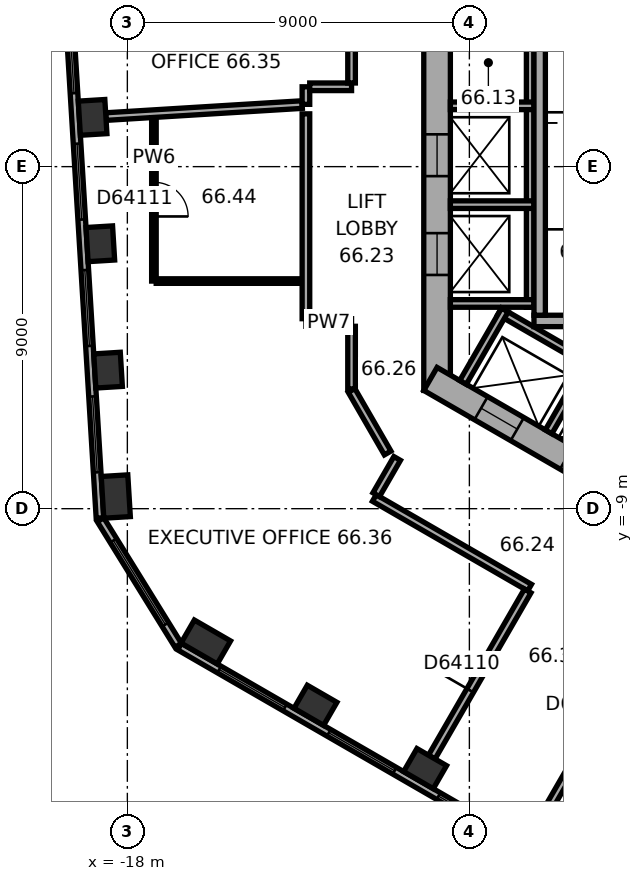
"""IFC4 building model, lengths in metres.
Left out: names, types, materials, properties, quantities, classifications, styles, units other than length and angle.
Written with IfcOpenShell. Run it as: python <this file> out.ifc"""

import sys

from ifc_helpers import new_model, si_unit, direction, frame, frame_2d, origin, origin_2d, place, context, subcontext, project, spatial, rectangle, extrude, element, fill, save


model = new_model("IFC4")
c1 = context("Model", 3, precision=1e-05, world=origin(), true_north=direction((0.0, 1.0)))
c2 = subcontext(c1, "Body", "Model", "MODEL_VIEW")
j1 = project(units=[si_unit("LENGTHUNIT", "METRE"), si_unit("PLANEANGLEUNIT", "RADIAN")], contexts=[c1])
p1 = place(None, origin())
s1 = spatial("IfcSite", under=j1, at=p1, CompositionType="ELEMENT")
p2 = place(p1, origin())
s2 = spatial("IfcBuilding", under=s1, at=p2, CompositionType="ELEMENT")
p3 = place(p2, frame((0.0, 0.0, 267.2)))
s3 = spatial("IfcBuildingStorey", under=s2, at=p3, CompositionType="ELEMENT", Elevation=267.2)
for number, where, z_axis, x_axis in (
    (1, (-18.914, 1.296, 0.0), (0.0, 0.0, 1.0), (0.061, -0.998, 0.0)),
    (2, (-18.711, -2.03, 0.0), (0.0, 0.0, 1.0), (0.061, -0.998, 0.0)),
    (3, (-18.508, -5.355, 0.0), (0.0, 0.0, 1.0), (0.061, -0.998, 0.0)),
):
    element("IfcColumn", number, at=place(p3, frame(where, z_axis=z_axis, x_axis=x_axis)), inside=s3, PredefinedType="COLUMN", context=c2, shape_type="SweptSolid", body=[
        extrude(rectangle(XDim=0.9, YDim=0.7, at=origin_2d()), origin(), (0.0, 0.0, 1.0), 3.7),
    ])
for number, where, z_axis, x_axis in (
    (4, (-18.304, -8.68, 0.0), (0.0, 0.0, 1.0), (0.061, -0.998, 0.0)),
    (5, (-15.936, -12.508, 0.0), (0.0, 0.0, 1.0), (0.866, -0.5, 0.0)),
):
    element("IfcColumn", number, at=place(p3, frame(where, z_axis=z_axis, x_axis=x_axis)), inside=s3, PredefinedType="COLUMN", context=c2, shape_type="SweptSolid", body=[
        extrude(rectangle(XDim=1.1, YDim=0.7, at=origin_2d()), origin(), (0.0, 0.0, 1.0), 3.7),
    ])
for number, where, z_axis, x_axis in (
    (6, (-13.05, -14.174, 0.0), (0.0, 0.0, 1.0), (0.866, -0.5, 0.0)),
    (7, (-10.165, -15.84, 0.0), (0.0, 0.0, 1.0), (0.866, -0.5, 0.0)),
):
    element("IfcColumn", number, at=place(p3, frame(where, z_axis=z_axis, x_axis=x_axis)), inside=s3, PredefinedType="COLUMN", context=c2, shape_type="SweptSolid", body=[
        extrude(rectangle(XDim=0.9, YDim=0.7, at=origin_2d()), origin(), (0.0, 0.0, 1.0), 3.7),
    ])
p4 = place(p3, frame((-9.85, 5.889, 0.0), z_axis=(0.0, 0.0, 1.0), x_axis=(0.0, -1.0, 0.0)))
e8 = element("IfcWall", 8, at=p4, inside=s3, PredefinedType="SHEAR", context=c2, shape_type="SweptSolid", body=[
    extrude(rectangle(XDim=11.778, YDim=0.7, at=frame_2d((5.889, 0.0))), origin(), (0.0, 0.0, 1.0), 3.7),
])
p5 = place(p4, frame((5.039, 0.0, 0.0)))
e9 = element("IfcOpeningElement", 9, at=p5, cuts=e8, PredefinedType="OPENING", context=c2, shape_type="SweptSolid", body=[
    extrude(rectangle(XDim=1.1, YDim=2.1, at=frame_2d((0.55, 1.05))), frame((0.0, 0.36, 0.0), z_axis=(0.0, -1.0, 0.0), x_axis=(1.0, 0.0, 0.0)), (0.0, 0.0, 1.0), 0.72),
])
p6 = place(p4, frame((7.639, 0.0, 0.0)))
e10 = element("IfcOpeningElement", 10, at=p6, cuts=e8, PredefinedType="OPENING", context=c2, shape_type="SweptSolid", body=[
    extrude(rectangle(XDim=1.1, YDim=2.1, at=frame_2d((0.55, 1.05))), frame((0.0, 0.36, 0.0), z_axis=(0.0, -1.0, 0.0), x_axis=(1.0, 0.0, 0.0)), (0.0, 0.0, 1.0), 0.72),
])
p7 = place(p3, frame((-10.025, -5.586, 0.0), z_axis=(0.0, 0.0, 1.0), x_axis=(0.866026453023, -0.499998182661, 0.0)))
e11 = element("IfcWall", 11, at=p7, inside=s3, PredefinedType="SHEAR", context=c2, shape_type="SweptSolid", body=[
    extrude(rectangle(XDim=11.778, YDim=0.7, at=frame_2d((5.889, 0.0))), origin(), (0.0, 0.0, 1.0), 3.7),
])
p8 = place(p7, frame((6.089, 0.0, 0.0)))
e12 = element("IfcOpeningElement", 12, at=p8, cuts=e11, PredefinedType="OPENING", context=c2, shape_type="SweptSolid", body=[
    extrude(rectangle(XDim=1.5, YDim=2.1, at=frame_2d((0.75, 1.05))), frame((0.0, 0.36, 0.0), z_axis=(0.0, -1.0, 0.0), x_axis=(1.0, 0.0, 0.0)), (0.0, 0.0, 1.0), 0.72),
])
p9 = place(p7, frame((1.539, 0.0, 0.0)))
e13 = element("IfcOpeningElement", 13, at=p9, cuts=e11, PredefinedType="OPENING", context=c2, shape_type="SweptSolid", body=[
    extrude(rectangle(XDim=1.1, YDim=2.1, at=frame_2d((0.55, 1.05))), frame((0.0, 0.36, 0.0), z_axis=(0.0, -1.0, 0.0), x_axis=(1.0, 0.0, 0.0)), (0.0, 0.0, 1.0), 0.72),
])
p10 = place(p7, frame((4.139, 0.0, 0.0)))
e14 = element("IfcOpeningElement", 14, at=p10, cuts=e11, PredefinedType="OPENING", context=c2, shape_type="SweptSolid", body=[
    extrude(rectangle(XDim=1.1, YDim=2.1, at=frame_2d((0.55, 1.05))), frame((0.0, 0.36, 0.0), z_axis=(0.0, -1.0, 0.0), x_axis=(1.0, 0.0, 0.0)), (0.0, 0.0, 1.0), 0.72),
])
p11 = place(p3, frame((-19.803, 8.454, 0.0), z_axis=(0.0, 0.0, 1.0), x_axis=(0.061036717565, -0.998135521414, 0.0)))
e15 = element("IfcWall", 15, at=p11, inside=s3, PredefinedType="STANDARD", context=c2, shape_type="SweptSolid", body=[
    extrude(rectangle(XDim=17.731, YDim=0.2, at=frame_2d((8.866, 0.0))), origin(), (0.0, 0.0, 1.0), 3.7),
])
p12 = place(p11, frame((1.202, 0.0, 0.9)))
e16 = element("IfcOpeningElement", 16, at=p12, cuts=e15, PredefinedType="OPENING", context=c2, shape_type="SweptSolid", body=[
    extrude(rectangle(XDim=2.0, YDim=2.0, at=frame_2d((1.0, 1.0))), frame((0.0, 0.11, 0.0), z_axis=(0.0, -1.0, 0.0), x_axis=(1.0, 0.0, 0.0)), (0.0, 0.0, 1.0), 0.22),
])
p13 = place(p11, frame((4.533, 0.0, 0.9)))
e17 = element("IfcOpeningElement", 17, at=p13, cuts=e15, PredefinedType="OPENING", context=c2, shape_type="SweptSolid", body=[
    extrude(rectangle(XDim=2.0, YDim=2.0, at=frame_2d((1.0, 1.0))), frame((0.0, 0.11, 0.0), z_axis=(0.0, -1.0, 0.0), x_axis=(1.0, 0.0, 0.0)), (0.0, 0.0, 1.0), 0.22),
])
p14 = place(p11, frame((7.865, 0.0, 0.9)))
e18 = element("IfcOpeningElement", 18, at=p14, cuts=e15, PredefinedType="OPENING", context=c2, shape_type="SweptSolid", body=[
    extrude(rectangle(XDim=2.0, YDim=2.0, at=frame_2d((1.0, 1.0))), frame((0.0, 0.11, 0.0), z_axis=(0.0, -1.0, 0.0), x_axis=(1.0, 0.0, 0.0)), (0.0, 0.0, 1.0), 0.22),
])
p15 = place(p11, frame((11.197, 0.0, 0.9)))
e19 = element("IfcOpeningElement", 19, at=p15, cuts=e15, PredefinedType="OPENING", context=c2, shape_type="SweptSolid", body=[
    extrude(rectangle(XDim=2.0, YDim=2.0, at=frame_2d((1.0, 1.0))), frame((0.0, 0.11, 0.0), z_axis=(0.0, -1.0, 0.0), x_axis=(1.0, 0.0, 0.0)), (0.0, 0.0, 1.0), 0.22),
])
p16 = place(p11, frame((14.528, 0.0, 0.9)))
e20 = element("IfcOpeningElement", 20, at=p16, cuts=e15, PredefinedType="OPENING", context=c2, shape_type="SweptSolid", body=[
    extrude(rectangle(XDim=2.0, YDim=2.0, at=frame_2d((1.0, 1.0))), frame((0.0, 0.11, 0.0), z_axis=(0.0, -1.0, 0.0), x_axis=(1.0, 0.0, 0.0)), (0.0, 0.0, 1.0), 0.22),
])
p17 = place(p3, frame((-18.706, -9.291, 0.0), z_axis=(0.0, 0.0, 1.0), x_axis=(0.526209683648, -0.850354848775, 0.0)))
e21 = element("IfcWall", 21, at=p17, inside=s3, PredefinedType="STANDARD", context=c2, shape_type="SweptSolid", body=[
    extrude(rectangle(XDim=3.886, YDim=0.2, at=frame_2d((1.943, 0.0))), origin(), (0.0, 0.0, 1.0), 3.7),
])
p18 = place(p17, frame((0.643, 0.0, 0.9)))
e22 = element("IfcOpeningElement", 22, at=p18, cuts=e21, PredefinedType="OPENING", context=c2, shape_type="SweptSolid", body=[
    extrude(rectangle(XDim=2.6, YDim=2.0, at=frame_2d((1.3, 1.0))), frame((0.0, 0.11, 0.0), z_axis=(0.0, -1.0, 0.0), x_axis=(1.0, 0.0, 0.0)), (0.0, 0.0, 1.0), 0.22),
])
p19 = place(p3, frame((-16.626, -12.629, 0.0), z_axis=(0.0, 0.0, 1.0), x_axis=(0.866026460444, -0.499998169808, 0.0)))
e23 = element("IfcWall", 23, at=p19, inside=s3, PredefinedType="STANDARD", context=c2, shape_type="SweptSolid", body=[
    extrude(rectangle(XDim=17.731, YDim=0.2, at=frame_2d((8.866, 0.0))), origin(), (0.0, 0.0, 1.0), 3.7),
])
p20 = place(p19, frame((1.203, 0.0, 0.9)))
e24 = element("IfcOpeningElement", 24, at=p20, cuts=e23, PredefinedType="OPENING", context=c2, shape_type="SweptSolid", body=[
    extrude(rectangle(XDim=2.0, YDim=2.0, at=frame_2d((1.0, 1.0))), frame((0.0, 0.11, 0.0), z_axis=(0.0, -1.0, 0.0), x_axis=(1.0, 0.0, 0.0)), (0.0, 0.0, 1.0), 0.22),
])
p21 = place(p19, frame((4.535, 0.0, 0.9)))
e25 = element("IfcOpeningElement", 25, at=p21, cuts=e23, PredefinedType="OPENING", context=c2, shape_type="SweptSolid", body=[
    extrude(rectangle(XDim=2.0, YDim=2.0, at=frame_2d((1.0, 1.0))), frame((0.0, 0.11, 0.0), z_axis=(0.0, -1.0, 0.0), x_axis=(1.0, 0.0, 0.0)), (0.0, 0.0, 1.0), 0.22),
])
p22 = place(p19, frame((7.867, 0.0, 0.9)))
e26 = element("IfcOpeningElement", 26, at=p22, cuts=e23, PredefinedType="OPENING", context=c2, shape_type="SweptSolid", body=[
    extrude(rectangle(XDim=2.0, YDim=2.0, at=frame_2d((1.0, 1.0))), frame((0.0, 0.11, 0.0), z_axis=(0.0, -1.0, 0.0), x_axis=(1.0, 0.0, 0.0)), (0.0, 0.0, 1.0), 0.22),
])
p23 = place(p19, frame((11.198, 0.0, 0.9)))
e27 = element("IfcOpeningElement", 27, at=p23, cuts=e23, PredefinedType="OPENING", context=c2, shape_type="SweptSolid", body=[
    extrude(rectangle(XDim=2.0, YDim=2.0, at=frame_2d((1.0, 1.0))), frame((0.0, 0.11, 0.0), z_axis=(0.0, -1.0, 0.0), x_axis=(1.0, 0.0, 0.0)), (0.0, 0.0, 1.0), 0.22),
])
p24 = place(p19, frame((14.53, 0.0, 0.9)))
e28 = element("IfcOpeningElement", 28, at=p24, cuts=e23, PredefinedType="OPENING", context=c2, shape_type="SweptSolid", body=[
    extrude(rectangle(XDim=2.0, YDim=2.0, at=frame_2d((1.0, 1.0))), frame((0.0, 0.11, 0.0), z_axis=(0.0, -1.0, 0.0), x_axis=(1.0, 0.0, 0.0)), (0.0, 0.0, 1.0), 0.22),
])
p25 = place(p3, frame((-7.4, 4.3, 0.0), z_axis=(0.0, 0.0, 1.0), x_axis=(0.0, -1.0, 0.0)))
e29 = element("IfcWall", 29, at=p25, inside=s3, PredefinedType="PARTITIONING", context=c2, shape_type="SweptSolid", body=[
    extrude(rectangle(XDim=8.0, YDim=0.2, at=frame_2d((4.0, 0.0))), origin(), (0.0, 0.0, 1.0), 3.42),
])
for number, where, z_axis, x_axis in (
    (30, (-7.3, 1.6, 0.0), (0.0, 0.0, 1.0), (-1.0, 0.0, 0.0)),
    (31, (-7.3, -1.0, 0.0), (0.0, 0.0, 1.0), (-1.0, 0.0, 0.0)),
    (32, (-7.3, -3.6, 0.0), (0.0, 0.0, 1.0), (-1.0, 0.0, 0.0)),
):
    element("IfcWall", number, at=place(p3, frame(where, z_axis=z_axis, x_axis=x_axis)), inside=s3, PredefinedType="PARTITIONING", context=c2, shape_type="SweptSolid", body=[
        extrude(rectangle(XDim=2.2, YDim=0.2, at=frame_2d((1.1, 0.0))), origin(), (0.0, 0.0, 1.0), 3.42),
    ])
p26 = place(p3, frame((-8.203, -3.809, 0.0), z_axis=(0.0, 0.0, 1.0), x_axis=(0.866028230842, -0.499995103361, 0.0)))
e33 = element("IfcWall", 33, at=p26, inside=s3, PredefinedType="PARTITIONING", context=c2, shape_type="SweptSolid", body=[
    extrude(rectangle(XDim=5.4, YDim=0.2, at=frame_2d((2.7, 0.0))), origin(), (0.0, 0.0, 1.0), 3.42),
])
for number, where, z_axis, x_axis in (
    (34, (-8.067, -3.772, 0.0), (0.0, 0.0, 1.0), (-0.5, -0.866, 0.0)),
    (35, (-5.815, -5.072, 0.0), (0.0, 0.0, 1.0), (-0.5, -0.866, 0.0)),
):
    element("IfcWall", number, at=place(p3, frame(where, z_axis=z_axis, x_axis=x_axis)), inside=s3, PredefinedType="PARTITIONING", context=c2, shape_type="SweptSolid", body=[
        extrude(rectangle(XDim=2.2, YDim=0.2, at=frame_2d((1.1, 0.0))), origin(), (0.0, 0.0, 1.0), 3.42),
    ])
p27 = place(p3, frame((-2.6, -4.06, 0.0), z_axis=(0.0, 0.0, 1.0), x_axis=(-1.0, 0.0, 0.0)))
e36 = element("IfcWall", 36, at=p27, inside=s3, PredefinedType="SHEAR", context=c2, shape_type="SweptSolid", body=[
    extrude(rectangle(XDim=4.7, YDim=0.3, at=frame_2d((2.35, 0.0))), origin(), (0.0, 0.0, 1.0), 3.42),
])
p28 = place(p3, frame((-7.15, 3.15, 0.0), z_axis=(0.0, 0.0, 1.0), x_axis=(0.0, -1.0, 0.0)))
e37 = element("IfcWall", 37, at=p28, inside=s3, PredefinedType="SHEAR", context=c2, shape_type="SweptSolid", body=[
    extrude(rectangle(XDim=7.06, YDim=0.3, at=frame_2d((3.53, 0.0))), origin(), (0.0, 0.0, 1.0), 3.42),
])
p29 = place(p3, frame((-18.565, 1.317, 0.0), z_axis=(0.0, 0.0, 1.0), x_axis=(0.998136844425, 0.061015078472, 0.0)))
e38 = element("IfcWall", 38, at=p29, inside=s3, PredefinedType="PARTITIONING", context=c2, shape_type="SweptSolid", body=[
    extrude(rectangle(XDim=5.174, YDim=0.2, at=frame_2d((2.587, 0.0))), origin(), (0.0, 0.0, 1.0), 2.87),
])
p30 = place(p3, frame((-17.301, -3.011, 0.0), z_axis=(0.0, 0.0, 1.0), x_axis=(0.0, 1.0, 0.0)))
e39 = element("IfcWall", 39, at=p30, inside=s3, PredefinedType="PARTITIONING", context=c2, shape_type="SweptSolid", body=[
    extrude(rectangle(XDim=4.3, YDim=0.12, at=frame_2d((2.15, 0.0))), origin(), (0.0, 0.0, 1.0), 3.42),
])
p31 = place(p30, frame((1.7, 0.0, 0.0)))
e40 = element("IfcOpeningElement", 40, at=p31, cuts=e39, PredefinedType="OPENING", context=c2, shape_type="SweptSolid", body=[
    extrude(rectangle(XDim=0.9, YDim=2.1, at=frame_2d((0.45, 1.05))), frame((0.0, 0.07, 0.0), z_axis=(0.0, -1.0, 0.0), x_axis=(1.0, 0.0, 0.0)), (0.0, 0.0, 1.0), 0.14),
])
p32 = place(p3, frame((-13.401, -3.011, 0.0), z_axis=(0.0, 0.0, 1.0), x_axis=(-1.0, 0.0, 0.0)))
e41 = element("IfcWall", 41, at=p32, inside=s3, PredefinedType="PARTITIONING", context=c2, shape_type="SweptSolid", body=[
    extrude(rectangle(XDim=3.84, YDim=0.12, at=frame_2d((1.92, 0.0))), origin(), (0.0, 0.0, 1.0), 3.42),
])
p33 = place(p3, frame((-13.301, -4.101, 0.0), z_axis=(0.0, 0.0, 1.0), x_axis=(1.0, 0.0, 0.0)))
e42 = element("IfcWall", 42, at=p33, inside=s3, PredefinedType="PARTITIONING", context=c2, shape_type="SweptSolid", body=[
    extrude(rectangle(XDim=1.201, YDim=0.2, at=frame_2d((0.601, 0.0))), origin(), (0.0, 0.0, 1.0), 3.42),
])
p34 = place(p3, frame((-13.301, 1.389, 0.0), z_axis=(0.0, 0.0, 1.0), x_axis=(0.0, -1.0, 0.0)))
e43 = element("IfcWall", 43, at=p34, inside=s3, PredefinedType="PARTITIONING", context=c2, shape_type="SweptSolid", body=[
    extrude(rectangle(XDim=5.39, YDim=0.2, at=frame_2d((2.695, 0.0))), origin(), (0.0, 0.0, 1.0), 3.42),
])
p35 = place(p3, frame((-13.301, 2.101, 0.0), z_axis=(0.0, 0.0, 1.0), x_axis=(0.0, -1.0, 0.0)))
e44 = element("IfcWall", 44, at=p35, inside=s3, PredefinedType="PARTITIONING", context=c2, shape_type="SweptSolid", body=[
    extrude(rectangle(XDim=0.462, YDim=0.2, at=frame_2d((0.231, 0.0))), origin(), (0.0, 0.0, 1.0), 3.42),
])
p36 = place(p3, frame((-12.1, -5.889, 0.0), z_axis=(0.0, 0.0, 1.0), x_axis=(0.500063520245, -0.865988727248, 0.0)))
e45 = element("IfcWall", 45, at=p36, inside=s3, PredefinedType="PARTITIONING", context=c2, shape_type="SweptSolid", body=[
    extrude(rectangle(XDim=1.9, YDim=0.2, at=frame_2d((0.95, 0.0))), origin(), (0.0, 0.0, 1.0), 3.42),
])
p37 = place(p3, frame((-12.1, -4.201, 0.0), z_axis=(0.0, 0.0, 1.0), x_axis=(0.0, -1.0, 0.0)))
e46 = element("IfcWall", 46, at=p37, inside=s3, PredefinedType="PARTITIONING", context=c2, shape_type="SweptSolid", body=[
    extrude(rectangle(XDim=1.648, YDim=0.2, at=frame_2d((0.824, 0.0))), origin(), (0.0, 0.0, 1.0), 3.42),
])
p38 = place(p3, frame((-12.1, 2.101, 0.0), z_axis=(0.0, 0.0, 1.0), x_axis=(-1.0, 0.0, 0.0)))
e47 = element("IfcWall", 47, at=p38, inside=s3, PredefinedType="PARTITIONING", context=c2, shape_type="SweptSolid", body=[
    extrude(rectangle(XDim=1.101, YDim=0.2, at=frame_2d((0.55, 0.0))), origin(), (0.0, 0.0, 1.0), 3.42),
])
p39 = place(p3, frame((-12.1, 5.889, 0.0), z_axis=(0.0, 0.0, 1.0), x_axis=(0.0, -1.0, 0.0)))
e48 = element("IfcWall", 48, at=p39, inside=s3, PredefinedType="PARTITIONING", context=c2, shape_type="SweptSolid", body=[
    extrude(rectangle(XDim=3.688, YDim=0.2, at=frame_2d((1.844, 0.0))), origin(), (0.0, 0.0, 1.0), 3.42),
])
p40 = place(p39, frame((1.763, 0.0, 0.0)))
e49 = element("IfcOpeningElement", 49, at=p40, cuts=e48, PredefinedType="OPENING", context=c2, shape_type="SweptSolid", body=[
    extrude(rectangle(XDim=1.0, YDim=2.1, at=frame_2d((0.5, 1.05))), frame((0.0, 0.11, 0.0), z_axis=(0.0, -1.0, 0.0), x_axis=(1.0, 0.0, 0.0)), (0.0, 0.0, 1.0), 0.22),
])
p41 = place(p3, frame((-11.501, -8.719, 0.0), z_axis=(0.0, 0.0, 1.0), x_axis=(0.866024434742, -0.500001678427, 0.0)))
e50 = element("IfcWall", 50, at=p41, inside=s3, PredefinedType="PARTITIONING", context=c2, shape_type="SweptSolid", body=[
    extrude(rectangle(XDim=4.718, YDim=0.2, at=frame_2d((2.359, 0.0))), origin(), (0.0, 0.0, 1.0), 3.42),
])
p42 = place(p3, frame((-10.901, -7.678, 0.0), z_axis=(0.0, 0.0, 1.0), x_axis=(-0.500074377092, -0.865982457891, 0.0)))
e51 = element("IfcWall", 51, at=p42, inside=s3, PredefinedType="PARTITIONING", context=c2, shape_type="SweptSolid", body=[
    extrude(rectangle(XDim=1.101, YDim=0.2, at=frame_2d((0.55, 0.0))), origin(), (0.0, 0.0, 1.0), 3.42),
])
p43 = place(p3, frame((-9.99, -15.537, 0.0), z_axis=(0.0, 0.0, 1.0), x_axis=(0.499966611936, 0.866044679534, 0.0)))
e52 = element("IfcWall", 52, at=p43, inside=s3, PredefinedType="PARTITIONING", context=c2, shape_type="SweptSolid", body=[
    extrude(rectangle(XDim=5.049, YDim=0.2, at=frame_2d((2.524, 0.0))), origin(), (0.0, 0.0, 1.0), 2.87),
])
p44 = place(p43, frame((2.024, 0.0, 0.0)))
e53 = element("IfcOpeningElement", 53, at=p44, cuts=e52, PredefinedType="OPENING", context=c2, shape_type="SweptSolid", body=[
    extrude(rectangle(XDim=1.0, YDim=2.1, at=frame_2d((0.5, 1.05))), frame((0.0, 0.11, 0.0), z_axis=(0.0, -1.0, 0.0), x_axis=(1.0, 0.0, 0.0)), (0.0, 0.0, 1.0), 0.22),
])
p45 = place(p3, frame((-7.105, -17.202, 0.0), z_axis=(0.0, 0.0, 1.0), x_axis=(0.499988692146, 0.866031932279, 0.0)))
e54 = element("IfcWall", 54, at=p45, inside=s3, PredefinedType="PARTITIONING", context=c2, shape_type="SweptSolid", body=[
    extrude(rectangle(XDim=6.35, YDim=0.2, at=frame_2d((3.175, 0.0))), origin(), (0.0, 0.0, 1.0), 3.42),
])
p46 = place(p45, frame((2.675, 0.0, 0.0)))
e55 = element("IfcOpeningElement", 55, at=p46, cuts=e54, PredefinedType="OPENING", context=c2, shape_type="SweptSolid", body=[
    extrude(rectangle(XDim=1.0, YDim=2.1, at=frame_2d((0.5, 1.05))), frame((0.0, 0.11, 0.0), z_axis=(0.0, -1.0, 0.0), x_axis=(1.0, 0.0, 0.0)), (0.0, 0.0, 1.0), 0.22),
])
p47 = place(p13, origin())
e56 = element("IfcWindow", 56, at=p47, inside=s3, PartitioningType="SINGLE_PANEL", PredefinedType="WINDOW", context=c2, shape_type="SweptSolid", body=[
    extrude(rectangle(XDim=2.0, YDim=2.0, at=frame_2d((1.0, 1.0))), frame((0.0, 0.03, 0.0), z_axis=(0.0, -1.0, 0.0), x_axis=(1.0, 0.0, 0.0)), (0.0, 0.0, 1.0), 0.06),
])
fill(e17, e56)
p48 = place(p14, origin())
e57 = element("IfcWindow", 57, at=p48, inside=s3, PartitioningType="SINGLE_PANEL", PredefinedType="WINDOW", context=c2, shape_type="SweptSolid", body=[
    extrude(rectangle(XDim=2.0, YDim=2.0, at=frame_2d((1.0, 1.0))), frame((0.0, 0.03, 0.0), z_axis=(0.0, -1.0, 0.0), x_axis=(1.0, 0.0, 0.0)), (0.0, 0.0, 1.0), 0.06),
])
fill(e18, e57)
p49 = place(p15, origin())
e58 = element("IfcWindow", 58, at=p49, inside=s3, PartitioningType="SINGLE_PANEL", PredefinedType="WINDOW", context=c2, shape_type="SweptSolid", body=[
    extrude(rectangle(XDim=2.0, YDim=2.0, at=frame_2d((1.0, 1.0))), frame((0.0, 0.03, 0.0), z_axis=(0.0, -1.0, 0.0), x_axis=(1.0, 0.0, 0.0)), (0.0, 0.0, 1.0), 0.06),
])
fill(e19, e58)
p50 = place(p16, origin())
e59 = element("IfcWindow", 59, at=p50, inside=s3, PartitioningType="SINGLE_PANEL", PredefinedType="WINDOW", context=c2, shape_type="SweptSolid", body=[
    extrude(rectangle(XDim=2.0, YDim=2.0, at=frame_2d((1.0, 1.0))), frame((0.0, 0.03, 0.0), z_axis=(0.0, -1.0, 0.0), x_axis=(1.0, 0.0, 0.0)), (0.0, 0.0, 1.0), 0.06),
])
fill(e20, e59)
p51 = place(p18, origin())
e60 = element("IfcWindow", 60, at=p51, inside=s3, PartitioningType="SINGLE_PANEL", PredefinedType="WINDOW", context=c2, shape_type="SweptSolid", body=[
    extrude(rectangle(XDim=2.6, YDim=2.0, at=frame_2d((1.3, 1.0))), frame((0.0, 0.03, 0.0), z_axis=(0.0, -1.0, 0.0), x_axis=(1.0, 0.0, 0.0)), (0.0, 0.0, 1.0), 0.06),
])
fill(e22, e60)
p52 = place(p20, origin())
e61 = element("IfcWindow", 61, at=p52, inside=s3, PartitioningType="SINGLE_PANEL", PredefinedType="WINDOW", context=c2, shape_type="SweptSolid", body=[
    extrude(rectangle(XDim=2.0, YDim=2.0, at=frame_2d((1.0, 1.0))), frame((0.0, 0.03, 0.0), z_axis=(0.0, -1.0, 0.0), x_axis=(1.0, 0.0, 0.0)), (0.0, 0.0, 1.0), 0.06),
])
fill(e24, e61)
p53 = place(p21, origin())
e62 = element("IfcWindow", 62, at=p53, inside=s3, PartitioningType="SINGLE_PANEL", PredefinedType="WINDOW", context=c2, shape_type="SweptSolid", body=[
    extrude(rectangle(XDim=2.0, YDim=2.0, at=frame_2d((1.0, 1.0))), frame((0.0, 0.03, 0.0), z_axis=(0.0, -1.0, 0.0), x_axis=(1.0, 0.0, 0.0)), (0.0, 0.0, 1.0), 0.06),
])
fill(e25, e62)
p54 = place(p22, origin())
e63 = element("IfcWindow", 63, at=p54, inside=s3, PartitioningType="SINGLE_PANEL", PredefinedType="WINDOW", context=c2, shape_type="SweptSolid", body=[
    extrude(rectangle(XDim=2.0, YDim=2.0, at=frame_2d((1.0, 1.0))), frame((0.0, 0.03, 0.0), z_axis=(0.0, -1.0, 0.0), x_axis=(1.0, 0.0, 0.0)), (0.0, 0.0, 1.0), 0.06),
])
fill(e26, e63)
p55 = place(p5, origin())
e64 = element("IfcDoor", 64, at=p55, inside=s3, OperationType="DOUBLE_DOOR_SLIDING", PredefinedType="DOOR", context=c2, shape_type="SweptSolid", body=[
    extrude(rectangle(XDim=1.1, YDim=2.1, at=frame_2d((0.55, 1.05))), frame((0.0, 0.025, 0.0), z_axis=(0.0, -1.0, 0.0), x_axis=(1.0, 0.0, 0.0)), (0.0, 0.0, 1.0), 0.05),
])
fill(e9, e64)
p56 = place(p6, origin())
e65 = element("IfcDoor", 65, at=p56, inside=s3, OperationType="DOUBLE_DOOR_SLIDING", PredefinedType="DOOR", context=c2, shape_type="SweptSolid", body=[
    extrude(rectangle(XDim=1.1, YDim=2.1, at=frame_2d((0.55, 1.05))), frame((0.0, 0.025, 0.0), z_axis=(0.0, -1.0, 0.0), x_axis=(1.0, 0.0, 0.0)), (0.0, 0.0, 1.0), 0.05),
])
fill(e10, e65)
p57 = place(p9, origin())
e66 = element("IfcDoor", 66, at=p57, inside=s3, OperationType="DOUBLE_DOOR_SLIDING", PredefinedType="DOOR", context=c2, shape_type="SweptSolid", body=[
    extrude(rectangle(XDim=1.1, YDim=2.1, at=frame_2d((0.55, 1.05))), frame((0.0, 0.025, 0.0), z_axis=(0.0, -1.0, 0.0), x_axis=(1.0, 0.0, 0.0)), (0.0, 0.0, 1.0), 0.05),
])
fill(e13, e66)
p58 = place(p44, origin())
e67 = element("IfcDoor", 67, at=p58, inside=s3, OperationType="SINGLE_SWING_LEFT", PredefinedType="DOOR", context=c2, shape_type="SweptSolid", body=[
    extrude(rectangle(XDim=1.0, YDim=2.1, at=frame_2d((0.5, 1.05))), frame((0.0, 0.025, 0.0), z_axis=(0.0, -1.0, 0.0), x_axis=(1.0, 0.0, 0.0)), (0.0, 0.0, 1.0), 0.05),
])
fill(e53, e67)
p59 = place(p31, origin())
e68 = element("IfcDoor", 68, at=p59, inside=s3, OperationType="SINGLE_SWING_LEFT", PredefinedType="DOOR", context=c2, shape_type="SweptSolid", body=[
    extrude(rectangle(XDim=0.9, YDim=2.1, at=frame_2d((0.45, 1.05))), frame((0.0, 0.025, 0.0), z_axis=(0.0, -1.0, 0.0), x_axis=(1.0, 0.0, 0.0)), (0.0, 0.0, 1.0), 0.05),
])
fill(e40, e68)
save(model, sys.argv[1])
